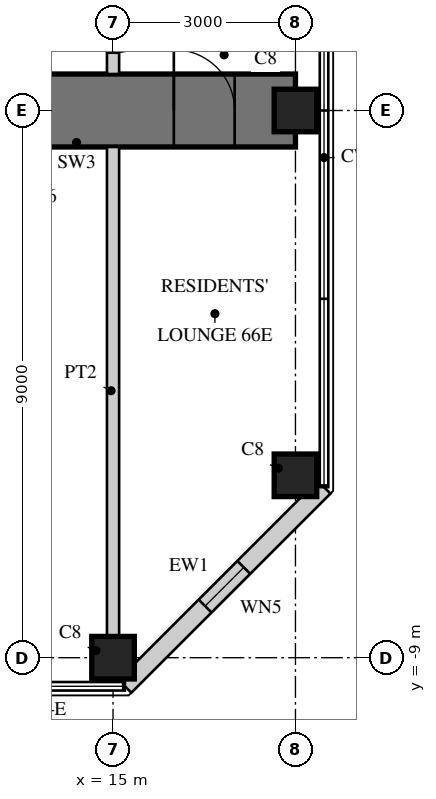
"""IFC4 building model, lengths in metres.
Left out: names, types, materials, properties, quantities, classifications, styles, units other than length and angle.
Written with IfcOpenShell. Run it as: python <this file> out.ifc"""

import sys

from ifc_helpers import new_model, si_unit, direction, frame, frame_2d, origin, origin_2d, place, context, subcontext, project, spatial, rectangle, hollow_rectangle, extrude, element, fill, save


model = new_model("IFC4")
c1 = context("Model", 3, precision=1e-05, world=origin(), true_north=direction((0.0, 1.0)))
c2 = subcontext(c1, "Body", "Model", "MODEL_VIEW")
j1 = project(units=[si_unit("LENGTHUNIT", "METRE"), si_unit("PLANEANGLEUNIT", "RADIAN")], contexts=[c1])
p1 = place(None, origin())
s1 = spatial("IfcSite", under=j1, at=p1, CompositionType="ELEMENT")
p2 = place(p1, origin())
s2 = spatial("IfcBuilding", under=s1, at=p2, CompositionType="ELEMENT")
p3 = place(p2, frame((0.0, 0.0, 257.7)))
s3 = spatial("IfcBuildingStorey", under=s2, at=p3, CompositionType="ELEMENT", Elevation=257.7)
p4 = place(p3, frame((9.0, 0.0, 0.0), z_axis=(0.0, 0.0, 1.0), x_axis=(1.0, 0.0, 0.0)))
e1 = element("IfcWall", 1, at=p4, inside=s3, PredefinedType="SHEAR", context=c2, shape_type="SweptSolid", body=[
    extrude(rectangle(XDim=9.0, YDim=1.2, at=frame_2d((4.5, 0.0))), origin(), (0.0, 0.0, 1.0), 3.4),
])
p5 = place(p4, frame((3.8, 0.0, 0.0)))
e2 = element("IfcOpeningElement", 2, at=p5, cuts=e1, PredefinedType="OPENING", context=c2, shape_type="SweptSolid", body=[
    extrude(rectangle(XDim=1.0, YDim=2.15, at=frame_2d((0.5, 1.075))), frame((0.0, 0.61, 0.0), z_axis=(0.0, -1.0, 0.0), x_axis=(1.0, 0.0, 0.0)), (0.0, 0.0, 1.0), 1.22),
])
p6 = place(p4, frame((7.0, 0.0, 0.0)))
e3 = element("IfcOpeningElement", 3, at=p6, cuts=e1, PredefinedType="OPENING", context=c2, shape_type="SweptSolid", body=[
    extrude(rectangle(XDim=1.0, YDim=2.2, at=frame_2d((0.5, 1.1))), frame((0.0, 0.61, 0.0), z_axis=(0.0, -1.0, 0.0), x_axis=(1.0, 0.0, 0.0)), (0.0, 0.0, 1.0), 1.22),
])
for number, where, z_axis, x_axis in (
    (4, (15.0, -9.0, 0.0), (0.0, 0.0, 1.0), (1.0, 0.0, 0.0)),
    (5, (18.0, -6.0, 0.0), (0.0, 0.0, 1.0), (1.0, 0.0, 0.0)),
    (6, (18.0, 0.0, 0.0), (0.0, 0.0, 1.0), (1.0, 0.0, 0.0)),
):
    element("IfcColumn", number, at=place(p3, frame(where, z_axis=z_axis, x_axis=x_axis)), inside=s3, PredefinedType="COLUMN", context=c2, shape_type="SweptSolid", body=[
        extrude(rectangle(XDim=0.7, YDim=0.7, at=origin_2d()), origin(), (0.0, 0.0, 1.0), 3.4),
    ])
p7 = place(p3, frame((15.195, -9.47, 0.0), z_axis=(0.0, 0.0, 1.0), x_axis=(0.707106781187, 0.707106781187, 0.0)))
e7 = element("IfcWall", 7, at=p7, inside=s3, PredefinedType="SOLIDWALL", context=c2, shape_type="SweptSolid", body=[
    extrude(rectangle(XDim=4.632, YDim=0.3, at=frame_2d((2.316, 0.0))), origin(), (0.0, 0.0, 1.0), 3.22),
])
p8 = place(p7, frame((1.866, 0.0, 0.3)))
e8 = element("IfcOpeningElement", 8, at=p8, cuts=e7, PredefinedType="OPENING", context=c2, shape_type="SweptSolid", body=[
    extrude(rectangle(XDim=0.9, YDim=2.4, at=frame_2d((0.45, 1.2))), frame((0.0, 0.16, 0.0), z_axis=(0.0, -1.0, 0.0), x_axis=(1.0, 0.0, 0.0)), (0.0, 0.0, 1.0), 0.32),
])
p9 = place(p3, frame((15.0, -8.65, 0.0), z_axis=(0.0, 0.0, 1.0), x_axis=(0.0, 1.0, 0.0)))
e9 = element("IfcWall", 9, at=p9, inside=s3, PredefinedType="SOLIDWALL", context=c2, shape_type="SweptSolid", body=[
    extrude(rectangle(XDim=8.05, YDim=0.2, at=frame_2d((4.025, 0.0))), origin(), (0.0, 0.0, 1.0), 2.52),
])
p10 = place(p3, frame((15.0, 0.6, 0.0), z_axis=(0.0, 0.0, 1.0), x_axis=(0.0, 1.0, 0.0)))
e10 = element("IfcWall", 10, at=p10, inside=s3, PredefinedType="SOLIDWALL", context=c2, shape_type="SweptSolid", body=[
    extrude(rectangle(XDim=8.05, YDim=0.2, at=frame_2d((4.025, 0.0))), origin(), (0.0, 0.0, 1.0), 2.52),
])
p11 = place(p10, frame((0.35, 0.0, 0.0)))
e11 = element("IfcOpeningElement", 11, at=p11, cuts=e10, PredefinedType="OPENING", context=c2, shape_type="SweptSolid", body=[
    extrude(rectangle(XDim=1.0, YDim=2.2, at=frame_2d((0.5, 1.1))), frame((0.0, 0.11, 0.0), z_axis=(0.0, -1.0, 0.0), x_axis=(1.0, 0.0, 0.0)), (0.0, 0.0, 1.0), 0.22),
])
p12 = place(p8, origin())
e12 = element("IfcWindow", 12, at=p12, inside=s3, PartitioningType="SINGLE_PANEL", PredefinedType="WINDOW", context=c2, shape_type="SweptSolid", body=[
    extrude(hollow_rectangle(XDim=0.9, YDim=2.4, WallThickness=0.06, at=frame_2d((0.45, 1.2))), frame((0.0, 0.03, 0.0), z_axis=(0.0, -1.0, 0.0), x_axis=(1.0, 0.0, 0.0)), (0.0, 0.0, 1.0), 0.06),
    extrude(rectangle(XDim=0.779, YDim=2.279, at=frame_2d((0.45, 1.2))), frame((0.0, 0.03, 0.0), z_axis=(0.0, -1.0, 0.0), x_axis=(1.0, 0.0, 0.0)), (0.0, 0.0, 1.0), 0.06),
])
fill(e8, e12)
p13 = place(p11, frame((1.0, 0.0, 0.0), z_axis=(0.0, 0.0, 1.0), x_axis=(-1.0, 0.0, 0.0)))
e13 = element("IfcDoor", 13, at=p13, inside=s3, OperationType="SINGLE_SWING_LEFT", PredefinedType="DOOR", context=c2, shape_type="SweptSolid", body=[
    extrude(rectangle(XDim=1.0, YDim=2.2, at=frame_2d((0.5, 1.1))), frame((0.0, 0.025, 0.0), z_axis=(0.0, -1.0, 0.0), x_axis=(1.0, 0.0, 0.0)), (0.0, 0.0, 1.0), 0.05),
])
fill(e11, e13)
p14 = place(p6, origin())
e14 = element("IfcDoor", 14, at=p14, inside=s3, OperationType="SINGLE_SWING_LEFT", PredefinedType="DOOR", context=c2, shape_type="SweptSolid", body=[
    extrude(rectangle(XDim=1.0, YDim=2.2, at=frame_2d((0.5, 1.1))), frame((0.0, 0.025, 0.0), z_axis=(0.0, -1.0, 0.0), x_axis=(1.0, 0.0, 0.0)), (0.0, 0.0, 1.0), 0.05),
])
fill(e3, e14)
save(model, sys.argv[1])
